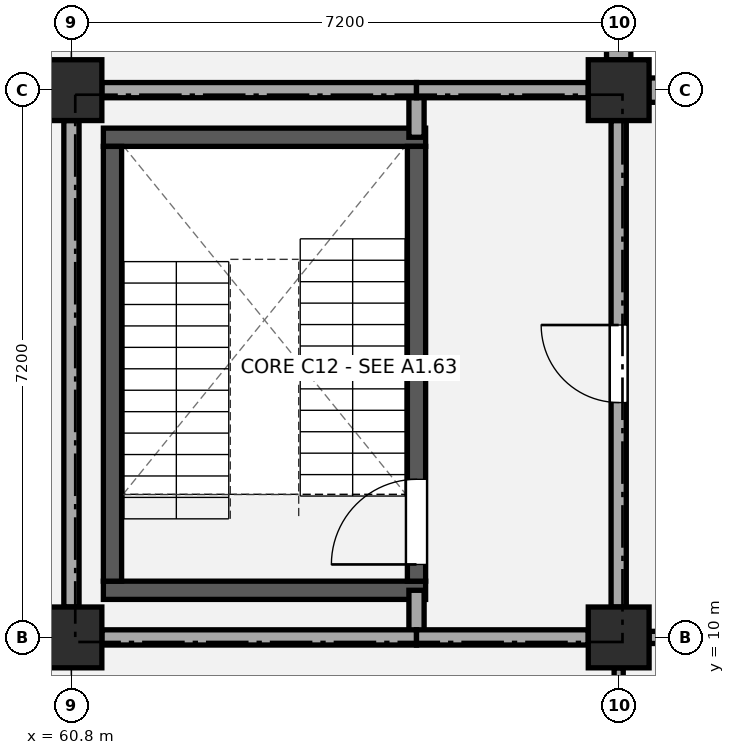
"""IFC4 building model, lengths in metres.
Left out: names, types, materials, properties, quantities, classifications, styles, units other than length and angle.
Written with IfcOpenShell. Run it as: python <this file> out.ifc"""

import sys

from ifc_helpers import new_model, si_unit, direction, frame, frame_2d, origin, origin_2d, place, context, subcontext, project, spatial, rectangle, extrude, element, fill, save


model = new_model("IFC4")
c1 = context("Model", 3, precision=1e-05, world=origin(), true_north=direction((0.0, 1.0)))
c2 = subcontext(c1, "Body", "Model", "MODEL_VIEW")
j1 = project(units=[si_unit("LENGTHUNIT", "METRE"), si_unit("PLANEANGLEUNIT", "RADIAN")], contexts=[c1])
p1 = place(None, origin())
s1 = spatial("IfcSite", under=j1, at=p1, CompositionType="ELEMENT")
p2 = place(p1, origin())
s2 = spatial("IfcBuilding", under=s1, at=p2, CompositionType="ELEMENT")
p3 = place(p2, frame((0.0, 0.0, 9.18)))
s3 = spatial("IfcBuildingStorey", under=s2, at=p3, CompositionType="ELEMENT", Elevation=9.18)
for number, where, z_axis, x_axis in (
    (1, (60.8, 10.0, 0.0), (0.0, 0.0, 1.0), (1.0, 0.0, 0.0)),
    (2, (60.8, 17.2, 0.0), (0.0, 0.0, 1.0), (1.0, 0.0, 0.0)),
    (3, (68.0, 10.0, 0.0), (0.0, 0.0, 1.0), (1.0, 0.0, 0.0)),
    (4, (68.0, 17.2, 0.0), (0.0, 0.0, 1.0), (1.0, 0.0, 0.0)),
):
    element("IfcColumn", number, at=place(p3, frame(where, z_axis=z_axis, x_axis=x_axis)), inside=s3, PredefinedType="COLUMN", context=c2, shape_type="SweptSolid", body=[
        extrude(rectangle(XDim=0.8, YDim=0.8, at=origin_2d()), origin(), (0.0, 0.0, 1.0), 4.32),
    ])
p4 = place(p3, frame((68.395, 17.2, 0.0), z_axis=(0.0, 0.0, 1.0), x_axis=(1.0, 0.0, 0.0)))
e5 = element("IfcWall", 5, at=p4, inside=s3, PredefinedType="STANDARD", context=c2, shape_type="SweptSolid", body=[
    extrude(rectangle(XDim=6.51, YDim=0.32, at=frame_2d((3.255, 0.0))), origin(), (0.0, 0.0, 1.0), 3.48),
])
p5 = place(p4, frame((1.905, 0.0, 0.95)))
e6 = element("IfcOpeningElement", 6, at=p5, cuts=e5, PredefinedType="OPENING", context=c2, shape_type="SweptSolid", body=[
    extrude(rectangle(XDim=2.7, YDim=1.7, at=frame_2d((1.35, 0.85))), frame((0.0, 0.17, 0.0), z_axis=(0.0, -1.0, 0.0), x_axis=(1.0, 0.0, 0.0)), (0.0, 0.0, 1.0), 0.34),
])
p6 = place(p3, frame((68.0, 24.005, 0.0), z_axis=(0.0, 0.0, 1.0), x_axis=(0.0, -1.0, 0.0)))
e7 = element("IfcWall", 7, at=p6, inside=s3, PredefinedType="STANDARD", context=c2, shape_type="SweptSolid", body=[
    extrude(rectangle(XDim=6.41, YDim=0.32, at=frame_2d((3.205, 0.0))), origin(), (0.0, 0.0, 1.0), 3.48),
])
for number, where, z_axis, x_axis in (
    (8, (61.22, 10.62, 0.0), (0.0, 0.0, 1.0), (1.0, 0.0, 0.0)),
    (9, (61.22, 16.58, 0.0), (0.0, 0.0, 1.0), (1.0, 0.0, 0.0)),
):
    element("IfcWall", number, at=place(p3, frame(where, z_axis=z_axis, x_axis=x_axis)), inside=s3, PredefinedType="SHEAR", context=c2, shape_type="SweptSolid", body=[
        extrude(rectangle(XDim=4.24, YDim=0.24, at=frame_2d((2.12, 0.0))), origin(), (0.0, 0.0, 1.0), 4.04),
    ])
p7 = place(p3, frame((61.34, 10.74, 0.0), z_axis=(0.0, 0.0, 1.0), x_axis=(0.0, 1.0, 0.0)))
e10 = element("IfcWall", 10, at=p7, inside=s3, PredefinedType="SHEAR", context=c2, shape_type="SweptSolid", body=[
    extrude(rectangle(XDim=5.72, YDim=0.24, at=frame_2d((2.86, 0.0))), origin(), (0.0, 0.0, 1.0), 4.04),
])
p8 = place(p3, frame((65.34, 10.74, 0.0), z_axis=(0.0, 0.0, 1.0), x_axis=(0.0, 1.0, 0.0)))
e11 = element("IfcWall", 11, at=p8, inside=s3, PredefinedType="SHEAR", context=c2, shape_type="SweptSolid", body=[
    extrude(rectangle(XDim=5.72, YDim=0.24, at=frame_2d((2.86, 0.0))), origin(), (0.0, 0.0, 1.0), 4.04),
])
p9 = place(p8, frame((0.22, 0.0, 0.0)))
e12 = element("IfcOpeningElement", 12, at=p9, cuts=e11, PredefinedType="OPENING", context=c2, shape_type="SweptSolid", body=[
    extrude(rectangle(XDim=1.12, YDim=2.15, at=frame_2d((0.56, 1.075))), frame((0.0, 0.13, 0.0), z_axis=(0.0, -1.0, 0.0), x_axis=(1.0, 0.0, 0.0)), (0.0, 0.0, 1.0), 0.26),
])
p10 = place(p3, frame((65.34, 10.0, 0.0), z_axis=(0.0, 0.0, 1.0), x_axis=(0.0, 1.0, 0.0)))
e13 = element("IfcWall", 13, at=p10, inside=s3, PredefinedType="PARTITIONING", context=c2, shape_type="SweptSolid", body=[
    extrude(rectangle(XDim=0.62, YDim=0.2, at=frame_2d((0.31, 0.0))), origin(), (0.0, 0.0, 1.0), 3.41),
])
p11 = place(p3, frame((65.34, 16.58, 0.0), z_axis=(0.0, 0.0, 1.0), x_axis=(0.0, 1.0, 0.0)))
e14 = element("IfcWall", 14, at=p11, inside=s3, PredefinedType="PARTITIONING", context=c2, shape_type="SweptSolid", body=[
    extrude(rectangle(XDim=0.62, YDim=0.2, at=frame_2d((0.31, 0.0))), origin(), (0.0, 0.0, 1.0), 3.38),
])
p12 = place(p3, frame((60.8, 10.4, 0.0), z_axis=(0.0, 0.0, 1.0), x_axis=(0.0, 1.0, 0.0)))
e15 = element("IfcWall", 15, at=p12, inside=s3, PredefinedType="PARTITIONING", context=c2, shape_type="SweptSolid", body=[
    extrude(rectangle(XDim=6.4, YDim=0.2, at=frame_2d((3.2, 0.0))), origin(), (0.0, 0.0, 1.0), 3.41),
])
p13 = place(p3, frame((68.0, 10.4, 0.0), z_axis=(0.0, 0.0, 1.0), x_axis=(0.0, 1.0, 0.0)))
e16 = element("IfcWall", 16, at=p13, inside=s3, PredefinedType="PARTITIONING", context=c2, shape_type="SweptSolid", body=[
    extrude(rectangle(XDim=6.4, YDim=0.2, at=frame_2d((3.2, 0.0))), origin(), (0.0, 0.0, 1.0), 3.43),
])
p14 = place(p13, frame((2.69, 0.0, 0.0)))
e17 = element("IfcOpeningElement", 17, at=p14, cuts=e16, PredefinedType="OPENING", context=c2, shape_type="SweptSolid", body=[
    extrude(rectangle(XDim=1.02, YDim=2.15, at=frame_2d((0.51, 1.075))), frame((0.0, 0.11, 0.0), z_axis=(0.0, -1.0, 0.0), x_axis=(1.0, 0.0, 0.0)), (0.0, 0.0, 1.0), 0.22),
])
p15 = place(p3, frame((61.2, 10.0, 0.0), z_axis=(0.0, 0.0, 1.0), x_axis=(1.0, 0.0, 0.0)))
e18 = element("IfcWall", 18, at=p15, inside=s3, PredefinedType="PARTITIONING", context=c2, shape_type="SweptSolid", body=[
    extrude(rectangle(XDim=4.14, YDim=0.2, at=frame_2d((2.07, 0.0))), origin(), (0.0, 0.0, 1.0), 3.41),
])
p16 = place(p3, frame((65.34, 10.0, 0.0), z_axis=(0.0, 0.0, 1.0), x_axis=(1.0, 0.0, 0.0)))
e19 = element("IfcWall", 19, at=p16, inside=s3, PredefinedType="PARTITIONING", context=c2, shape_type="SweptSolid", body=[
    extrude(rectangle(XDim=2.26, YDim=0.2, at=frame_2d((1.13, 0.0))), origin(), (0.0, 0.0, 1.0), 3.41),
])
p17 = place(p3, frame((61.2, 17.2, 0.0), z_axis=(0.0, 0.0, 1.0), x_axis=(1.0, 0.0, 0.0)))
e20 = element("IfcWall", 20, at=p17, inside=s3, PredefinedType="PARTITIONING", context=c2, shape_type="SweptSolid", body=[
    extrude(rectangle(XDim=4.14, YDim=0.2, at=frame_2d((2.07, 0.0))), origin(), (0.0, 0.0, 1.0), 3.38),
])
p18 = place(p3, frame((65.34, 17.2, 0.0), z_axis=(0.0, 0.0, 1.0), x_axis=(1.0, 0.0, 0.0)))
e21 = element("IfcWall", 21, at=p18, inside=s3, PredefinedType="PARTITIONING", context=c2, shape_type="SweptSolid", body=[
    extrude(rectangle(XDim=2.26, YDim=0.2, at=frame_2d((1.13, 0.0))), origin(), (0.0, 0.0, 1.0), 3.38),
])
p19 = place(p3, frame((68.0, 3.2, 0.0), z_axis=(0.0, 0.0, 1.0), x_axis=(0.0, 1.0, 0.0)))
e22 = element("IfcWall", 22, at=p19, inside=s3, PredefinedType="PARTITIONING", context=c2, shape_type="SweptSolid", body=[
    extrude(rectangle(XDim=6.4, YDim=0.12, at=frame_2d((3.2, 0.0))), origin(), (0.0, 0.0, 1.0), 3.36),
])
p20 = place(p3, frame((68.4, 10.0, 0.0), z_axis=(0.0, 0.0, 1.0), x_axis=(1.0, 0.0, 0.0)))
e23 = element("IfcWall", 23, at=p20, inside=s3, PredefinedType="PARTITIONING", context=c2, shape_type="SweptSolid", body=[
    extrude(rectangle(XDim=6.5, YDim=0.16, at=frame_2d((3.25, 0.0))), origin(), (0.0, 0.0, 1.0), 3.38),
])
p21 = place(p20, frame((2.71, 0.0, 0.0)))
e24 = element("IfcOpeningElement", 24, at=p21, cuts=e23, PredefinedType="OPENING", context=c2, shape_type="SweptSolid", body=[
    extrude(rectangle(XDim=1.08, YDim=2.16, at=frame_2d((0.54, 1.08))), frame((0.0, 0.09, 0.0), z_axis=(0.0, -1.0, 0.0), x_axis=(1.0, 0.0, 0.0)), (0.0, 0.0, 1.0), 0.18),
])
p22 = place(p9, origin())
e25 = element("IfcDoor", 25, at=p22, inside=s3, OperationType="SINGLE_SWING_LEFT", PredefinedType="DOOR", context=c2, shape_type="SweptSolid", body=[
    extrude(rectangle(XDim=1.12, YDim=2.15, at=frame_2d((0.56, 1.075))), frame((0.0, 0.025, 0.0), z_axis=(0.0, -1.0, 0.0), x_axis=(1.0, 0.0, 0.0)), (0.0, 0.0, 1.0), 0.05),
])
fill(e12, e25)
p23 = place(p14, origin())
e26 = element("IfcDoor", 26, at=p23, inside=s3, OperationType="SINGLE_SWING_RIGHT", PredefinedType="DOOR", context=c2, shape_type="SweptSolid", body=[
    extrude(rectangle(XDim=1.02, YDim=2.15, at=frame_2d((0.51, 1.075))), frame((0.0, 0.025, 0.0), z_axis=(0.0, -1.0, 0.0), x_axis=(1.0, 0.0, 0.0)), (0.0, 0.0, 1.0), 0.05),
])
fill(e17, e26)
save(model, sys.argv[1])
